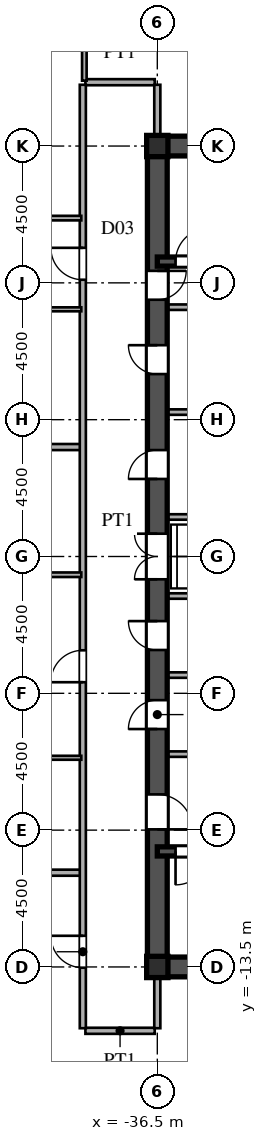
"""IFC4 building model, lengths in metres.
Left out: names, types, materials, properties, quantities, classifications, styles, units other than length and angle.
Written with IfcOpenShell. Run it as: python <this file> out.ifc"""

import sys

from ifc_helpers import new_model, si_unit, direction, frame, frame_2d, origin, origin_2d, place, context, subcontext, project, spatial, rectangle, i_section, extrude, source, transform, mapped, element, fill, save


model = new_model("IFC4")
c1 = context("Model", 3, precision=1e-05, world=origin(), true_north=direction((0.0, 1.0)))
c2 = subcontext(c1, "Body", "Model", "MODEL_VIEW")
j1 = project(units=[si_unit("LENGTHUNIT", "METRE"), si_unit("PLANEANGLEUNIT", "RADIAN")], contexts=[c1])
p1 = place(None, origin())
s1 = spatial("IfcSite", under=j1, at=p1, CompositionType="ELEMENT")
p2 = place(p1, origin())
s2 = spatial("IfcBuilding", under=s1, at=p2, CompositionType="ELEMENT")
p3 = place(p2, frame((0.0, 0.0, 117.6)))
s3 = spatial("IfcBuildingStorey", under=s2, at=p3, CompositionType="ELEMENT", Elevation=117.6)
m1 = source(origin(), c2, "Body", "SweptSolid", [
    extrude(i_section(OverallWidth=0.7, OverallDepth=0.7, WebThickness=0.028, FlangeThickness=0.045, at=origin_2d()), origin(), (0.0, 0.0, 1.0), 3.6),
])
for number, where, z_axis, x_axis in (
    (1, (-36.5, -13.5, 0.0), (0.0, 0.0, 1.0), (1.0, 0.0, 0.0)),
    (2, (-36.5, 13.5, 0.0), (0.0, 0.0, 1.0), (1.0, 0.0, 0.0)),
):
    element("IfcColumn", number, at=place(p3, frame(where, z_axis=z_axis, x_axis=x_axis)), inside=s3, PredefinedType="COLUMN", context=c2, shape_type="MappedRepresentation", body=[
        mapped(m1, transform((0.0, 0.0, 0.0), scale=1.0)),
    ])
for number, where, z_axis, x_axis in (
    (3, (-36.5, -13.5, 0.0), (0.0, 0.0, 1.0), (1.0, 0.0, 0.0)),
    (4, (-36.5, 13.5, 0.0), (0.0, 0.0, 1.0), (1.0, 0.0, 0.0)),
):
    element("IfcWall", number, at=place(p3, frame(where, z_axis=z_axis, x_axis=x_axis)), inside=s3, PredefinedType="SHEAR", context=c2, shape_type="SweptSolid", body=[
        extrude(rectangle(XDim=9.0, YDim=0.65, at=frame_2d((4.5, 0.0))), origin(), (0.0, 0.0, 1.0), 3.38),
    ])
p4 = place(p3, frame((-36.5, -13.65, 0.0), z_axis=(0.0, 0.0, 1.0), x_axis=(0.0, 1.0, 0.0)))
e5 = element("IfcWall", 5, at=p4, inside=s3, PredefinedType="SHEAR", context=c2, shape_type="SweptSolid", body=[
    extrude(rectangle(XDim=7.15, YDim=0.65, at=frame_2d((3.575, 0.0))), origin(), (0.0, 0.0, 1.0), 3.38),
])
p5 = place(p4, frame((4.675, 0.0, 0.0)))
e6 = element("IfcOpeningElement", 6, at=p5, cuts=e5, PredefinedType="OPENING", context=c2, shape_type="SweptSolid", body=[
    extrude(rectangle(XDim=1.15, YDim=2.2, at=frame_2d((0.575, 1.1))), frame((0.0, 0.335, 0.0), z_axis=(0.0, -1.0, 0.0), x_axis=(1.0, 0.0, 0.0)), (0.0, 0.0, 1.0), 0.67),
])
p6 = place(p3, frame((-36.5, -1.3, 0.0), z_axis=(0.0, 0.0, 1.0), x_axis=(0.0, 1.0, 0.0)))
e7 = element("IfcWall", 7, at=p6, inside=s3, PredefinedType="SHEAR", context=c2, shape_type="SweptSolid", body=[
    extrude(rectangle(XDim=2.6, YDim=0.65, at=frame_2d((1.3, 0.0))), origin(), (0.0, 0.0, 1.0), 3.38),
])
p7 = place(p6, frame((0.55, 0.0, 0.0)))
e8 = element("IfcOpeningElement", 8, at=p7, cuts=e7, PredefinedType="OPENING", context=c2, shape_type="SweptSolid", body=[
    extrude(rectangle(XDim=1.5, YDim=2.3, at=frame_2d((0.75, 1.15))), frame((0.0, 0.335, 0.0), z_axis=(0.0, -1.0, 0.0), x_axis=(1.0, 0.0, 0.0)), (0.0, 0.0, 1.0), 0.67),
])
p8 = place(p3, frame((-36.5, 8.2, 0.0), z_axis=(0.0, 0.0, 1.0), x_axis=(0.0, 1.0, 0.0)))
e9 = element("IfcWall", 9, at=p8, inside=s3, PredefinedType="SHEAR", context=c2, shape_type="SweptSolid", body=[
    extrude(rectangle(XDim=5.45, YDim=0.65, at=frame_2d((2.725, 0.0))), origin(), (0.0, 0.0, 1.0), 3.38),
])
p9 = place(p8, frame((0.245, 0.0, 0.0)))
e10 = element("IfcOpeningElement", 10, at=p9, cuts=e9, PredefinedType="OPENING", context=c2, shape_type="SweptSolid", body=[
    extrude(rectangle(XDim=0.95, YDim=2.15, at=frame_2d((0.475, 1.075))), frame((0.0, 0.335, 0.0), z_axis=(0.0, -1.0, 0.0), x_axis=(1.0, 0.0, 0.0)), (0.0, 0.0, 1.0), 0.67),
])
p10 = place(p3, frame((-36.5, -6.5, 0.0), z_axis=(0.0, 0.0, 1.0), x_axis=(0.0, 1.0, 0.0)))
e11 = element("IfcWall", 11, at=p10, inside=s3, PredefinedType="SHEAR", context=c2, shape_type="SweptSolid", body=[
    extrude(rectangle(XDim=2.6, YDim=0.65, at=frame_2d((1.3, 0.0))), origin(), (0.0, 0.0, 1.0), 3.38),
])
p11 = place(p10, frame((0.825, 0.0, 0.0)))
e12 = element("IfcOpeningElement", 12, at=p11, cuts=e11, PredefinedType="OPENING", context=c2, shape_type="SweptSolid", body=[
    extrude(rectangle(XDim=0.95, YDim=2.15, at=frame_2d((0.475, 1.075))), frame((0.0, 0.335, 0.0), z_axis=(0.0, -1.0, 0.0), x_axis=(1.0, 0.0, 0.0)), (0.0, 0.0, 1.0), 0.67),
])
p12 = place(p3, frame((-36.5, -3.9, 0.0), z_axis=(0.0, 0.0, 1.0), x_axis=(0.0, 1.0, 0.0)))
e13 = element("IfcWall", 13, at=p12, inside=s3, PredefinedType="SHEAR", context=c2, shape_type="SweptSolid", body=[
    extrude(rectangle(XDim=2.6, YDim=0.65, at=frame_2d((1.3, 0.0))), origin(), (0.0, 0.0, 1.0), 3.38),
])
p13 = place(p12, frame((0.825, 0.0, 0.0)))
e14 = element("IfcOpeningElement", 14, at=p13, cuts=e13, PredefinedType="OPENING", context=c2, shape_type="SweptSolid", body=[
    extrude(rectangle(XDim=0.95, YDim=2.15, at=frame_2d((0.475, 1.075))), frame((0.0, 0.335, 0.0), z_axis=(0.0, -1.0, 0.0), x_axis=(1.0, 0.0, 0.0)), (0.0, 0.0, 1.0), 0.67),
])
p14 = place(p3, frame((-36.5, 1.3, 0.0), z_axis=(0.0, 0.0, 1.0), x_axis=(0.0, 1.0, 0.0)))
e15 = element("IfcWall", 15, at=p14, inside=s3, PredefinedType="SHEAR", context=c2, shape_type="SweptSolid", body=[
    extrude(rectangle(XDim=3.45, YDim=0.65, at=frame_2d((1.725, 0.0))), origin(), (0.0, 0.0, 1.0), 3.38),
])
p15 = place(p14, frame((1.25, 0.0, 0.0)))
e16 = element("IfcOpeningElement", 16, at=p15, cuts=e15, PredefinedType="OPENING", context=c2, shape_type="SweptSolid", body=[
    extrude(rectangle(XDim=0.95, YDim=2.15, at=frame_2d((0.475, 1.075))), frame((0.0, 0.335, 0.0), z_axis=(0.0, -1.0, 0.0), x_axis=(1.0, 0.0, 0.0)), (0.0, 0.0, 1.0), 0.67),
])
p16 = place(p3, frame((-36.5, 4.75, 0.0), z_axis=(0.0, 0.0, 1.0), x_axis=(0.0, 1.0, 0.0)))
e17 = element("IfcWall", 17, at=p16, inside=s3, PredefinedType="SHEAR", context=c2, shape_type="SweptSolid", body=[
    extrude(rectangle(XDim=3.45, YDim=0.65, at=frame_2d((1.725, 0.0))), origin(), (0.0, 0.0, 1.0), 3.38),
])
p17 = place(p16, frame((1.25, 0.0, 0.0)))
e18 = element("IfcOpeningElement", 18, at=p17, cuts=e17, PredefinedType="OPENING", context=c2, shape_type="SweptSolid", body=[
    extrude(rectangle(XDim=0.95, YDim=2.15, at=frame_2d((0.475, 1.075))), frame((0.0, 0.335, 0.0), z_axis=(0.0, -1.0, 0.0), x_axis=(1.0, 0.0, 0.0)), (0.0, 0.0, 1.0), 0.67),
])
p18 = place(p3, frame((-36.5, -9.7, 0.0), z_axis=(0.0, 0.0, 1.0), x_axis=(1.0, 0.0, 0.0)))
e19 = element("IfcWall", 19, at=p18, inside=s3, PredefinedType="SHEAR", context=c2, shape_type="SweptSolid", body=[
    extrude(rectangle(XDim=9.0, YDim=0.3, at=frame_2d((4.5, 0.0))), origin(), (0.0, 0.0, 1.0), 3.38),
])
p19 = place(p18, frame((0.6, 0.0, 0.0)))
e20 = element("IfcOpeningElement", 20, at=p19, cuts=e19, PredefinedType="OPENING", context=c2, shape_type="SweptSolid", body=[
    extrude(rectangle(XDim=1.1, YDim=2.2, at=frame_2d((0.55, 1.1))), frame((0.0, 0.16, 0.0), z_axis=(0.0, -1.0, 0.0), x_axis=(1.0, 0.0, 0.0)), (0.0, 0.0, 1.0), 0.32),
])
p20 = place(p3, frame((-36.5, 9.7, 0.0), z_axis=(0.0, 0.0, 1.0), x_axis=(1.0, 0.0, 0.0)))
e21 = element("IfcWall", 21, at=p20, inside=s3, PredefinedType="SHEAR", context=c2, shape_type="SweptSolid", body=[
    extrude(rectangle(XDim=9.0, YDim=0.3, at=frame_2d((4.5, 0.0))), origin(), (0.0, 0.0, 1.0), 3.38),
])
p21 = place(p20, frame((0.6, 0.0, 0.0)))
e22 = element("IfcOpeningElement", 22, at=p21, cuts=e21, PredefinedType="OPENING", context=c2, shape_type="SweptSolid", body=[
    extrude(rectangle(XDim=1.1, YDim=2.2, at=frame_2d((0.55, 1.1))), frame((0.0, 0.16, 0.0), z_axis=(0.0, -1.0, 0.0), x_axis=(1.0, 0.0, 0.0)), (0.0, 0.0, 1.0), 0.32),
])
for number, where, z_axis, x_axis in (
    (23, (-36.15, -6.5, 0.0), (0.0, 0.0, 1.0), (1.0, 0.0, 0.0)),
    (24, (-36.15, 8.2, 0.0), (0.0, 0.0, 1.0), (1.0, 0.0, 0.0)),
):
    element("IfcWall", number, at=place(p3, frame(where, z_axis=z_axis, x_axis=x_axis)), inside=s3, PredefinedType="PARTITIONING", context=c2, shape_type="SweptSolid", body=[
        extrude(rectangle(XDim=5.7, YDim=0.18, at=frame_2d((2.85, 0.0))), origin(), (0.0, 0.0, 1.0), 3.38),
    ])
for number, where, z_axis, x_axis in (
    (25, (-36.15, -1.3, 0.0), (0.0, 0.0, 1.0), (1.0, 0.0, 0.0)),
    (26, (-36.15, 1.3, 0.0), (0.0, 0.0, 1.0), (1.0, 0.0, 0.0)),
    (27, (-36.15, -3.9, 0.0), (0.0, 0.0, 1.0), (1.0, 0.0, 0.0)),
    (28, (-36.15, 4.75, 0.0), (0.0, 0.0, 1.0), (1.0, 0.0, 0.0)),
):
    element("IfcWall", number, at=place(p3, frame(where, z_axis=z_axis, x_axis=x_axis)), inside=s3, PredefinedType="PARTITIONING", context=c2, shape_type="SweptSolid", body=[
        extrude(rectangle(XDim=2.95, YDim=0.18, at=frame_2d((1.475, 0.0))), origin(), (0.0, 0.0, 1.0), 3.38),
    ])
p22 = place(p3, frame((-38.865, -15.6, 0.0), z_axis=(0.0, 0.0, 1.0), x_axis=(1.0, 0.0, 0.0)))
e29 = element("IfcWall", 29, at=p22, inside=s3, PredefinedType="PARTITIONING", context=c2, shape_type="SweptSolid", body=[
    extrude(rectangle(XDim=2.28, YDim=0.2, at=frame_2d((1.14, 0.0))), origin(), (0.0, 0.0, 1.0), 3.38),
])
p23 = place(p3, frame((-58.988, -10.4, 0.0), z_axis=(0.0, 0.0, 1.0), x_axis=(1.0, 0.0, 0.0)))
e30 = element("IfcWall", 30, at=p23, inside=s3, PredefinedType="PARTITIONING", context=c2, shape_type="SweptSolid", body=[
    extrude(rectangle(XDim=19.958, YDim=0.2, at=frame_2d((9.979, 0.0))), origin(), (0.0, 0.0, 1.0), 3.38),
])
p24 = place(p3, frame((-42.35, -6.62, 0.0), z_axis=(0.0, 0.0, 1.0), x_axis=(1.0, 0.0, 0.0)))
e31 = element("IfcWall", 31, at=p24, inside=s3, PredefinedType="PARTITIONING", context=c2, shape_type="SweptSolid", body=[
    extrude(rectangle(XDim=3.35, YDim=0.13, at=frame_2d((1.675, 0.0))), origin(), (0.0, 0.0, 1.0), 3.38),
])
p25 = place(p24, frame((1.235, 0.0, 0.0)))
e32 = element("IfcOpeningElement", 32, at=p25, cuts=e31, PredefinedType="OPENING", context=c2, shape_type="SweptSolid", body=[
    extrude(rectangle(XDim=0.88, YDim=2.1, at=frame_2d((0.44, 1.05))), frame((0.0, 0.075, 0.0), z_axis=(0.0, -1.0, 0.0), x_axis=(1.0, 0.0, 0.0)), (0.0, 0.0, 1.0), 0.15),
])
p26 = place(p3, frame((-42.35, -0.6, 0.0), z_axis=(0.0, 0.0, 1.0), x_axis=(1.0, 0.0, 0.0)))
e33 = element("IfcWall", 33, at=p26, inside=s3, PredefinedType="PARTITIONING", context=c2, shape_type="SweptSolid", body=[
    extrude(rectangle(XDim=3.35, YDim=0.15, at=frame_2d((1.675, 0.0))), origin(), (0.0, 0.0, 1.0), 3.38),
])
p27 = place(p26, frame((1.2, 0.0, 0.0)))
e34 = element("IfcOpeningElement", 34, at=p27, cuts=e33, PredefinedType="OPENING", context=c2, shape_type="SweptSolid", body=[
    extrude(rectangle(XDim=0.95, YDim=2.15, at=frame_2d((0.475, 1.075))), frame((0.0, 0.085, 0.0), z_axis=(0.0, -1.0, 0.0), x_axis=(1.0, 0.0, 0.0)), (0.0, 0.0, 1.0), 0.17),
])
p28 = place(p3, frame((-69.505, 3.6, 0.0), z_axis=(0.0, 0.0, 1.0), x_axis=(1.0, 0.0, 0.0)))
e35 = element("IfcWall", 35, at=p28, inside=s3, PredefinedType="PARTITIONING", context=c2, shape_type="SweptSolid", body=[
    extrude(rectangle(XDim=30.475, YDim=0.2, at=frame_2d((15.237, 0.0))), origin(), (0.0, 0.0, 1.0), 3.38),
])
p29 = place(p3, frame((-42.35, 8.13, 0.0), z_axis=(0.0, 0.0, 1.0), x_axis=(1.0, 0.0, 0.0)))
e36 = element("IfcWall", 36, at=p29, inside=s3, PredefinedType="PARTITIONING", context=c2, shape_type="SweptSolid", body=[
    extrude(rectangle(XDim=3.35, YDim=0.13, at=frame_2d((1.675, 0.0))), origin(), (0.0, 0.0, 1.0), 3.38),
])
p30 = place(p29, frame((1.235, 0.0, 0.0)))
e37 = element("IfcOpeningElement", 37, at=p30, cuts=e36, PredefinedType="OPENING", context=c2, shape_type="SweptSolid", body=[
    extrude(rectangle(XDim=0.88, YDim=2.1, at=frame_2d((0.44, 1.05))), frame((0.0, 0.075, 0.0), z_axis=(0.0, -1.0, 0.0), x_axis=(1.0, 0.0, 0.0)), (0.0, 0.0, 1.0), 0.15),
])
p31 = place(p3, frame((-42.35, 11.13, 0.0), z_axis=(0.0, 0.0, 1.0), x_axis=(1.0, 0.0, 0.0)))
e38 = element("IfcWall", 38, at=p31, inside=s3, PredefinedType="PARTITIONING", context=c2, shape_type="SweptSolid", body=[
    extrude(rectangle(XDim=3.35, YDim=0.15, at=frame_2d((1.675, 0.0))), origin(), (0.0, 0.0, 1.0), 3.38),
])
p32 = place(p31, frame((1.2, 0.0, 0.0)))
e39 = element("IfcOpeningElement", 39, at=p32, cuts=e38, PredefinedType="OPENING", context=c2, shape_type="SweptSolid", body=[
    extrude(rectangle(XDim=0.95, YDim=2.15, at=frame_2d((0.475, 1.075))), frame((0.0, 0.085, 0.0), z_axis=(0.0, -1.0, 0.0), x_axis=(1.0, 0.0, 0.0)), (0.0, 0.0, 1.0), 0.17),
])
p33 = place(p3, frame((-38.865, 15.6, 0.0), z_axis=(0.0, 0.0, 1.0), x_axis=(1.0, 0.0, 0.0)))
e40 = element("IfcWall", 40, at=p33, inside=s3, PredefinedType="PARTITIONING", context=c2, shape_type="SweptSolid", body=[
    extrude(rectangle(XDim=2.28, YDim=0.2, at=frame_2d((1.14, 0.0))), origin(), (0.0, 0.0, 1.0), 3.38),
])
p34 = place(p3, frame((-38.95, -15.515, 0.0), z_axis=(0.0, 0.0, 1.0), x_axis=(0.0, 1.0, 0.0)))
e41 = element("IfcWall", 41, at=p34, inside=s3, PredefinedType="PARTITIONING", context=c2, shape_type="SweptSolid", body=[
    extrude(rectangle(XDim=31.03, YDim=0.2, at=frame_2d((15.515, 0.0))), origin(), (0.0, 0.0, 1.0), 3.38),
])
p35 = place(p34, frame((1.99, 0.0, 0.0)))
e42 = element("IfcOpeningElement", 42, at=p35, cuts=e41, PredefinedType="OPENING", context=c2, shape_type="SweptSolid", body=[
    extrude(rectangle(XDim=1.05, YDim=2.25, at=frame_2d((0.525, 1.125))), frame((0.0, 0.11, 0.0), z_axis=(0.0, -1.0, 0.0), x_axis=(1.0, 0.0, 0.0)), (0.0, 0.0, 1.0), 0.22),
])
p36 = place(p34, frame((11.38, 0.0, 0.0)))
e43 = element("IfcOpeningElement", 43, at=p36, cuts=e41, PredefinedType="OPENING", context=c2, shape_type="SweptSolid", body=[
    extrude(rectangle(XDim=1.05, YDim=2.25, at=frame_2d((0.525, 1.125))), frame((0.0, 0.11, 0.0), z_axis=(0.0, -1.0, 0.0), x_axis=(1.0, 0.0, 0.0)), (0.0, 0.0, 1.0), 0.22),
])
p37 = place(p34, frame((24.617, 0.0, 0.0)))
e44 = element("IfcOpeningElement", 44, at=p37, cuts=e41, PredefinedType="OPENING", context=c2, shape_type="SweptSolid", body=[
    extrude(rectangle(XDim=1.05, YDim=2.25, at=frame_2d((0.525, 1.125))), frame((0.0, 0.11, 0.0), z_axis=(0.0, -1.0, 0.0), x_axis=(1.0, 0.0, 0.0)), (0.0, 0.0, 1.0), 0.22),
])
p38 = place(p3, frame((-38.9, 15.65, 0.0), z_axis=(0.0, 0.0, 1.0), x_axis=(0.0, 1.0, 0.0)))
e45 = element("IfcWall", 45, at=p38, inside=s3, PredefinedType="PARTITIONING", context=c2, shape_type="SweptSolid", body=[
    extrude(rectangle(XDim=5.088, YDim=0.15, at=frame_2d((2.544, 0.0))), origin(), (0.0, 0.0, 1.0), 3.38),
])
p39 = place(p38, frame((1.175, 0.0, 0.0)))
e46 = element("IfcOpeningElement", 46, at=p39, cuts=e45, PredefinedType="OPENING", context=c2, shape_type="SweptSolid", body=[
    extrude(rectangle(XDim=0.95, YDim=2.15, at=frame_2d((0.475, 1.075))), frame((0.0, 0.085, 0.0), z_axis=(0.0, -1.0, 0.0), x_axis=(1.0, 0.0, 0.0)), (0.0, 0.0, 1.0), 0.17),
])
for number, where, z_axis, x_axis in (
    (47, (-36.5, -15.515, 0.0), (0.0, 0.0, 1.0), (0.0, 1.0, 0.0)),
    (48, (-36.5, 13.83, 0.0), (0.0, 0.0, 1.0), (0.0, 1.0, 0.0)),
):
    element("IfcWall", number, at=place(p3, frame(where, z_axis=z_axis, x_axis=x_axis)), inside=s3, PredefinedType="PARTITIONING", context=c2, shape_type="SweptSolid", body=[
        extrude(rectangle(XDim=1.685, YDim=0.2, at=frame_2d((0.842, 0.0))), origin(), (0.0, 0.0, 1.0), 2.78),
    ])
m2 = source(origin(), c2, "Body", "SweptSolid", [
    extrude(rectangle(XDim=1.15, YDim=2.2, at=frame_2d((0.575, 1.1))), frame((0.0, 0.025, 0.0), z_axis=(0.0, -1.0, 0.0), x_axis=(1.0, 0.0, 0.0)), (0.0, 0.0, 1.0), 0.05),
])
p40 = place(p5, frame((1.15, 0.0, 0.0), z_axis=(0.0, 0.0, 1.0), x_axis=(-1.0, 0.0, 0.0)))
e49 = element("IfcDoor", 49, at=p40, inside=s3, OperationType="SINGLE_SWING_LEFT", PredefinedType="DOOR", context=c2, shape_type="MappedRepresentation", body=[
    mapped(m2, transform((0.0, 0.0, 0.0), scale=1.0)),
])
fill(e6, e49)
m3 = source(origin(), c2, "Body", "SweptSolid", [
    extrude(rectangle(XDim=1.5, YDim=2.3, at=frame_2d((0.75, 1.15))), frame((0.0, 0.025, 0.0), z_axis=(0.0, -1.0, 0.0), x_axis=(1.0, 0.0, 0.0)), (0.0, 0.0, 1.0), 0.05),
])
p41 = place(p7, origin())
e50 = element("IfcDoor", 50, at=p41, inside=s3, OperationType="DOUBLE_SWING_LEFT", PredefinedType="DOOR", context=c2, shape_type="MappedRepresentation", body=[
    mapped(m3, transform((0.0, 0.0, 0.0), scale=1.0)),
])
fill(e8, e50)
m4 = source(origin(), c2, "Body", "SweptSolid", [
    extrude(rectangle(XDim=0.95, YDim=2.15, at=frame_2d((0.475, 1.075))), frame((0.0, 0.025, 0.0), z_axis=(0.0, -1.0, 0.0), x_axis=(1.0, 0.0, 0.0)), (0.0, 0.0, 1.0), 0.05),
])
p42 = place(p9, frame((0.95, 0.0, 0.0), z_axis=(0.0, 0.0, 1.0), x_axis=(-1.0, 0.0, 0.0)))
e51 = element("IfcDoor", 51, at=p42, inside=s3, OperationType="SINGLE_SWING_RIGHT", PredefinedType="DOOR", context=c2, shape_type="MappedRepresentation", body=[
    mapped(m4, transform((0.0, 0.0, 0.0), scale=1.0)),
])
fill(e10, e51)
p43 = place(p11, origin())
e52 = element("IfcDoor", 52, at=p43, inside=s3, OperationType="SINGLE_SWING_LEFT", PredefinedType="DOOR", context=c2, shape_type="MappedRepresentation", body=[
    mapped(m4, transform((0.0, 0.0, 0.0), scale=1.0)),
])
fill(e12, e52)
p44 = place(p13, origin())
e53 = element("IfcDoor", 53, at=p44, inside=s3, OperationType="SINGLE_SWING_RIGHT", PredefinedType="DOOR", context=c2, shape_type="MappedRepresentation", body=[
    mapped(m4, transform((0.0, 0.0, 0.0), scale=1.0)),
])
fill(e14, e53)
p45 = place(p15, origin())
e54 = element("IfcDoor", 54, at=p45, inside=s3, OperationType="SINGLE_SWING_LEFT", PredefinedType="DOOR", context=c2, shape_type="MappedRepresentation", body=[
    mapped(m4, transform((0.0, 0.0, 0.0), scale=1.0)),
])
fill(e16, e54)
p46 = place(p17, origin())
e55 = element("IfcDoor", 55, at=p46, inside=s3, OperationType="SINGLE_SWING_RIGHT", PredefinedType="DOOR", context=c2, shape_type="MappedRepresentation", body=[
    mapped(m4, transform((0.0, 0.0, 0.0), scale=1.0)),
])
fill(e18, e55)
m5 = source(origin(), c2, "Body", "SweptSolid", [
    extrude(rectangle(XDim=1.1, YDim=2.2, at=frame_2d((0.55, 1.1))), frame((0.0, 0.025, 0.0), z_axis=(0.0, -1.0, 0.0), x_axis=(1.0, 0.0, 0.0)), (0.0, 0.0, 1.0), 0.05),
])
p47 = place(p19, frame((1.1, 0.0, 0.0), z_axis=(0.0, 0.0, 1.0), x_axis=(-1.0, 0.0, 0.0)))
e56 = element("IfcDoor", 56, at=p47, inside=s3, OperationType="SINGLE_SWING_LEFT", PredefinedType="DOOR", context=c2, shape_type="MappedRepresentation", body=[
    mapped(m5, transform((0.0, 0.0, 0.0), scale=1.0)),
])
fill(e20, e56)
p48 = place(p21, origin())
e57 = element("IfcDoor", 57, at=p48, inside=s3, OperationType="SINGLE_SWING_RIGHT", PredefinedType="DOOR", context=c2, shape_type="MappedRepresentation", body=[
    mapped(m5, transform((0.0, 0.0, 0.0), scale=1.0)),
])
fill(e22, e57)
m6 = source(origin(), c2, "Body", "SweptSolid", [
    extrude(rectangle(XDim=1.05, YDim=2.25, at=frame_2d((0.525, 1.125))), frame((0.0, 0.025, 0.0), z_axis=(0.0, -1.0, 0.0), x_axis=(1.0, 0.0, 0.0)), (0.0, 0.0, 1.0), 0.05),
])
p49 = place(p35, origin())
e58 = element("IfcDoor", 58, at=p49, inside=s3, OperationType="SINGLE_SWING_RIGHT", PredefinedType="DOOR", context=c2, shape_type="MappedRepresentation", body=[
    mapped(m6, transform((0.0, 0.0, 0.0), scale=1.0)),
])
fill(e42, e58)
p50 = place(p36, origin())
e59 = element("IfcDoor", 59, at=p50, inside=s3, OperationType="SINGLE_SWING_LEFT", PredefinedType="DOOR", context=c2, shape_type="MappedRepresentation", body=[
    mapped(m6, transform((0.0, 0.0, 0.0), scale=1.0)),
])
fill(e43, e59)
p51 = place(p37, origin())
e60 = element("IfcDoor", 60, at=p51, inside=s3, OperationType="SINGLE_SWING_RIGHT", PredefinedType="DOOR", context=c2, shape_type="MappedRepresentation", body=[
    mapped(m6, transform((0.0, 0.0, 0.0), scale=1.0)),
])
fill(e44, e60)
save(model, sys.argv[1])
